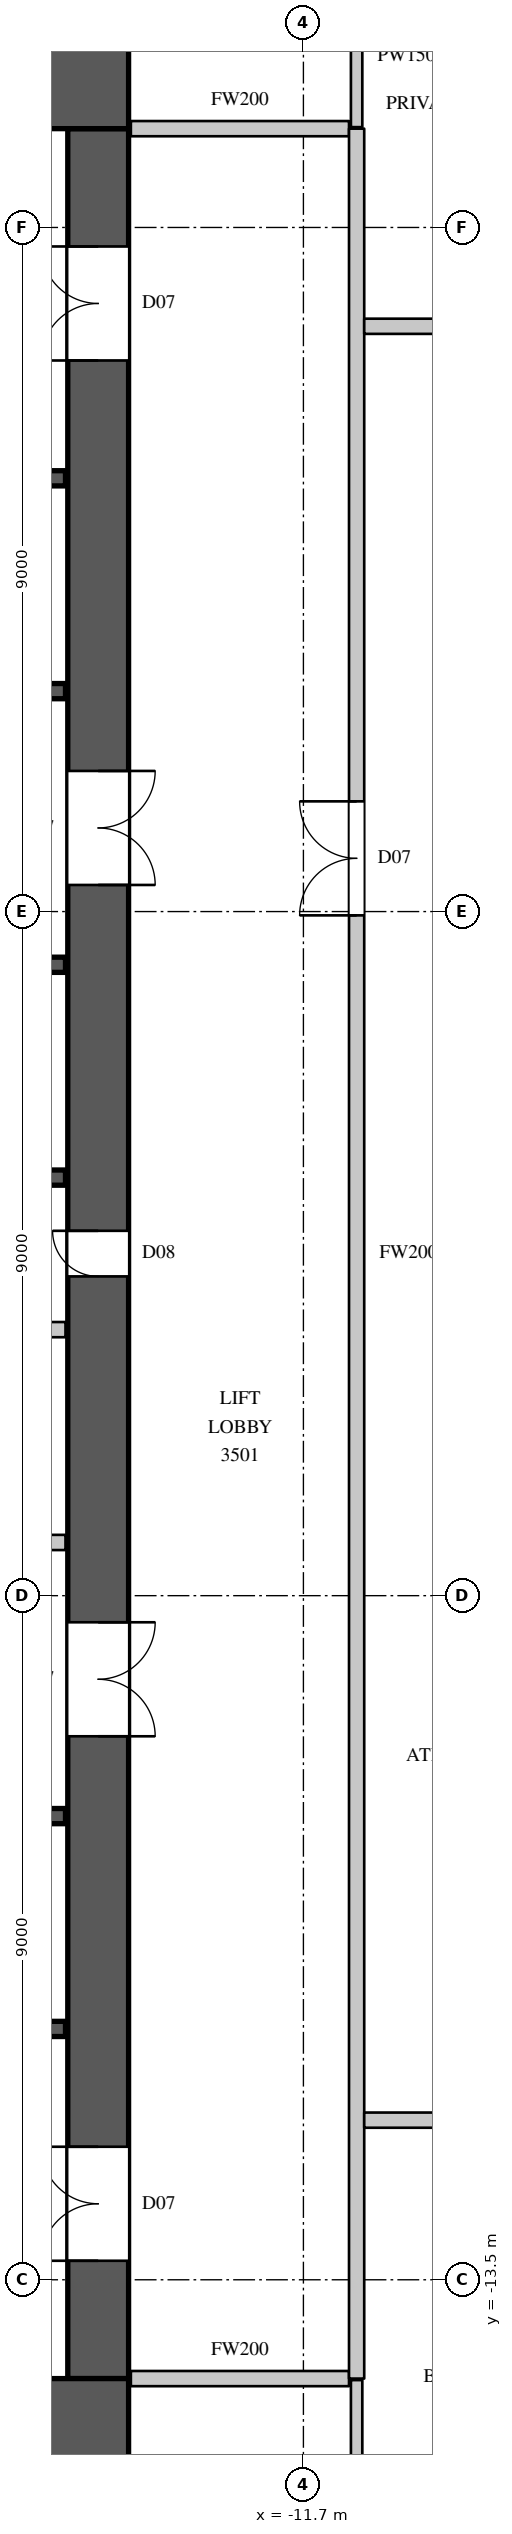
"""IFC4 building model, lengths in metres.
Left out: names, types, materials, properties, quantities, classifications, styles, units other than length and angle.
Written with IfcOpenShell. Run it as: python <this file> out.ifc"""

import sys

from ifc_helpers import new_model, si_unit, direction, frame, frame_2d, origin, place, context, subcontext, project, spatial, rectangle, extrude, element, fill, save


model = new_model("IFC4")
c1 = context("Model", 3, precision=1e-05, world=origin(), true_north=direction((0.0, 1.0)))
c2 = subcontext(c1, "Body", "Model", "MODEL_VIEW")
j1 = project(units=[si_unit("LENGTHUNIT", "METRE"), si_unit("PLANEANGLEUNIT", "RADIAN")], contexts=[c1])
p1 = place(None, origin())
s1 = spatial("IfcSite", under=j1, at=p1, CompositionType="ELEMENT")
p2 = place(p1, origin())
s2 = spatial("IfcBuilding", under=s1, at=p2, CompositionType="ELEMENT")
p3 = place(p2, frame((0.0, 0.0, 164.6)))
s3 = spatial("IfcBuildingStorey", under=s2, at=p3, CompositionType="ELEMENT", Elevation=164.6)
for number, where, z_axis, x_axis in (
    (1, (-30.0, 15.4, 0.0), (0.0, 0.0, 1.0), (1.0, 0.0, 0.0)),
    (2, (-30.0, -15.4, 0.0), (0.0, 0.0, 1.0), (1.0, 0.0, 0.0)),
):
    element("IfcWall", number, at=place(p3, frame(where, z_axis=z_axis, x_axis=x_axis)), inside=s3, PredefinedType="SHEAR", context=c2, shape_type="SweptSolid", body=[
        extrude(rectangle(XDim=16.0, YDim=1.2, at=frame_2d((8.0, 0.0))), origin(), (0.0, 0.0, 1.0), 4.1),
    ])
p4 = place(p3, frame((-14.4, -14.8, 0.0), z_axis=(0.0, 0.0, 1.0), x_axis=(0.0, 1.0, 0.0)))
e3 = element("IfcWall", 3, at=p4, inside=s3, PredefinedType="SHEAR", context=c2, shape_type="SweptSolid", body=[
    extrude(rectangle(XDim=29.6, YDim=0.8, at=frame_2d((14.8, 0.0))), origin(), (0.0, 0.0, 1.0), 4.1),
])
p5 = place(p4, frame((1.55, 0.0, 0.0)))
e4 = element("IfcOpeningElement", 4, at=p5, cuts=e3, PredefinedType="OPENING", context=c2, shape_type="SweptSolid", body=[
    extrude(rectangle(XDim=1.5, YDim=2.4, at=frame_2d((0.75, 1.2))), frame((0.0, 0.41, 0.0), z_axis=(0.0, -1.0, 0.0), x_axis=(1.0, 0.0, 0.0)), (0.0, 0.0, 1.0), 0.82),
])
p6 = place(p4, frame((26.55, 0.0, 0.0)))
e5 = element("IfcOpeningElement", 5, at=p6, cuts=e3, PredefinedType="OPENING", context=c2, shape_type="SweptSolid", body=[
    extrude(rectangle(XDim=1.5, YDim=2.4, at=frame_2d((0.75, 1.2))), frame((0.0, 0.41, 0.0), z_axis=(0.0, -1.0, 0.0), x_axis=(1.0, 0.0, 0.0)), (0.0, 0.0, 1.0), 0.82),
])
p7 = place(p4, frame((8.45, 0.0, 0.0)))
e6 = element("IfcOpeningElement", 6, at=p7, cuts=e3, PredefinedType="OPENING", context=c2, shape_type="SweptSolid", body=[
    extrude(rectangle(XDim=1.5, YDim=2.4, at=frame_2d((0.75, 1.2))), frame((0.0, 0.41, 0.0), z_axis=(0.0, -1.0, 0.0), x_axis=(1.0, 0.0, 0.0)), (0.0, 0.0, 1.0), 0.82),
])
p8 = place(p4, frame((19.65, 0.0, 0.0)))
e7 = element("IfcOpeningElement", 7, at=p8, cuts=e3, PredefinedType="OPENING", context=c2, shape_type="SweptSolid", body=[
    extrude(rectangle(XDim=1.5, YDim=2.4, at=frame_2d((0.75, 1.2))), frame((0.0, 0.41, 0.0), z_axis=(0.0, -1.0, 0.0), x_axis=(1.0, 0.0, 0.0)), (0.0, 0.0, 1.0), 0.82),
])
p9 = place(p4, frame((14.5, 0.0, 0.0)))
e8 = element("IfcOpeningElement", 8, at=p9, cuts=e3, PredefinedType="OPENING", context=c2, shape_type="SweptSolid", body=[
    extrude(rectangle(XDim=0.6, YDim=2.0, at=frame_2d((0.3, 1.0))), frame((0.0, 0.41, 0.0), z_axis=(0.0, -1.0, 0.0), x_axis=(1.0, 0.0, 0.0)), (0.0, 0.0, 1.0), 0.82),
])
p10 = place(p3, frame((-22.62, -3.8, 0.0), z_axis=(0.0, 0.0, 1.0), x_axis=(1.0, 0.0, 0.0)))
e9 = element("IfcWall", 9, at=p10, inside=s3, PredefinedType="PARTITIONING", context=c2, shape_type="SweptSolid", body=[
    extrude(rectangle(XDim=7.79, YDim=0.2, at=frame_2d((3.895, 0.0))), origin(), (0.0, 0.0, 1.0), 3.8),
])
p11 = place(p10, frame((3.45, 0.0, 0.0)))
e10 = element("IfcOpeningElement", 10, at=p11, cuts=e9, PredefinedType="OPENING", context=c2, shape_type="SweptSolid", body=[
    extrude(rectangle(XDim=0.9, YDim=2.2, at=frame_2d((0.45, 1.1))), frame((0.0, 0.11, 0.0), z_axis=(0.0, -1.0, 0.0), x_axis=(1.0, 0.0, 0.0)), (0.0, 0.0, 1.0), 0.22),
])
for number, where, z_axis, x_axis in (
    (11, (-13.97, -14.8, 0.0), (0.0, 0.0, 1.0), (1.0, 0.0, 0.0)),
    (12, (-13.97, 14.8, 0.0), (0.0, 0.0, 1.0), (1.0, 0.0, 0.0)),
):
    element("IfcWall", number, at=place(p3, frame(where, z_axis=z_axis, x_axis=x_axis)), inside=s3, PredefinedType="PARTITIONING", context=c2, shape_type="SweptSolid", body=[
        extrude(rectangle(XDim=2.87, YDim=0.2, at=frame_2d((1.435, 0.0))), origin(), (0.0, 0.0, 1.0), 3.8),
    ])
p12 = place(p3, frame((-11.0, -14.8, 0.0), z_axis=(0.0, 0.0, 1.0), x_axis=(0.0, 1.0, 0.0)))
e13 = element("IfcWall", 13, at=p12, inside=s3, PredefinedType="PARTITIONING", context=c2, shape_type="SweptSolid", body=[
    extrude(rectangle(XDim=29.6, YDim=0.2, at=frame_2d((14.8, 0.0))), origin(), (0.0, 0.0, 1.0), 3.8),
])
p13 = place(p12, frame((19.25, 0.0, 0.0)))
e14 = element("IfcOpeningElement", 14, at=p13, cuts=e13, PredefinedType="OPENING", context=c2, shape_type="SweptSolid", body=[
    extrude(rectangle(XDim=1.5, YDim=2.4, at=frame_2d((0.75, 1.2))), frame((0.0, 0.11, 0.0), z_axis=(0.0, -1.0, 0.0), x_axis=(1.0, 0.0, 0.0)), (0.0, 0.0, 1.0), 0.22),
])
p14 = place(p3, frame((-10.9, -11.4, 0.0), z_axis=(0.0, 0.0, 1.0), x_axis=(1.0, 0.0, 0.0)))
e15 = element("IfcWall", 15, at=p14, inside=s3, PredefinedType="PARTITIONING", context=c2, shape_type="SweptSolid", body=[
    extrude(rectangle(XDim=21.2, YDim=0.2, at=frame_2d((10.6, 0.0))), origin(), (0.0, 0.0, 1.0), 3.8),
])
p15 = place(p14, frame((0.95, 0.0, 0.0)))
e16 = element("IfcOpeningElement", 16, at=p15, cuts=e15, PredefinedType="OPENING", context=c2, shape_type="SweptSolid", body=[
    extrude(rectangle(XDim=0.95, YDim=2.2, at=frame_2d((0.475, 1.1))), frame((0.0, 0.11, 0.0), z_axis=(0.0, -1.0, 0.0), x_axis=(1.0, 0.0, 0.0)), (0.0, 0.0, 1.0), 0.22),
])
p16 = place(p14, frame((4.2, 0.0, 0.0)))
e17 = element("IfcOpeningElement", 17, at=p16, cuts=e15, PredefinedType="OPENING", context=c2, shape_type="SweptSolid", body=[
    extrude(rectangle(XDim=0.95, YDim=2.2, at=frame_2d((0.475, 1.1))), frame((0.0, 0.11, 0.0), z_axis=(0.0, -1.0, 0.0), x_axis=(1.0, 0.0, 0.0)), (0.0, 0.0, 1.0), 0.22),
])
p17 = place(p14, frame((7.1, 0.0, 0.0)))
e18 = element("IfcOpeningElement", 18, at=p17, cuts=e15, PredefinedType="OPENING", context=c2, shape_type="SweptSolid", body=[
    extrude(rectangle(XDim=0.9, YDim=2.2, at=frame_2d((0.45, 1.1))), frame((0.0, 0.11, 0.0), z_axis=(0.0, -1.0, 0.0), x_axis=(1.0, 0.0, 0.0)), (0.0, 0.0, 1.0), 0.22),
])
p18 = place(p14, frame((10.0, 0.0, 0.0)))
e19 = element("IfcOpeningElement", 19, at=p18, cuts=e15, PredefinedType="OPENING", context=c2, shape_type="SweptSolid", body=[
    extrude(rectangle(XDim=0.9, YDim=2.2, at=frame_2d((0.45, 1.1))), frame((0.0, 0.11, 0.0), z_axis=(0.0, -1.0, 0.0), x_axis=(1.0, 0.0, 0.0)), (0.0, 0.0, 1.0), 0.22),
])
p19 = place(p14, frame((13.55, 0.0, 0.0)))
e20 = element("IfcOpeningElement", 20, at=p19, cuts=e15, PredefinedType="OPENING", context=c2, shape_type="SweptSolid", body=[
    extrude(rectangle(XDim=0.9, YDim=2.2, at=frame_2d((0.45, 1.1))), frame((0.0, 0.11, 0.0), z_axis=(0.0, -1.0, 0.0), x_axis=(1.0, 0.0, 0.0)), (0.0, 0.0, 1.0), 0.22),
])
p20 = place(p14, frame((17.85, 0.0, 0.0)))
e21 = element("IfcOpeningElement", 21, at=p20, cuts=e15, PredefinedType="OPENING", context=c2, shape_type="SweptSolid", body=[
    extrude(rectangle(XDim=1.1, YDim=2.4, at=frame_2d((0.55, 1.2))), frame((0.0, 0.11, 0.0), z_axis=(0.0, -1.0, 0.0), x_axis=(1.0, 0.0, 0.0)), (0.0, 0.0, 1.0), 0.22),
])
p21 = place(p3, frame((-10.9, 12.2, 0.0), z_axis=(0.0, 0.0, 1.0), x_axis=(1.0, 0.0, 0.0)))
e22 = element("IfcWall", 22, at=p21, inside=s3, PredefinedType="PARTITIONING", context=c2, shape_type="SweptSolid", body=[
    extrude(rectangle(XDim=3.704, YDim=0.2, at=frame_2d((1.852, 0.0))), origin(), (0.0, 0.0, 1.0), 3.8),
])
p22 = place(p21, frame((1.7, 0.0, 0.0)))
e23 = element("IfcOpeningElement", 23, at=p22, cuts=e22, PredefinedType="OPENING", context=c2, shape_type="SweptSolid", body=[
    extrude(rectangle(XDim=1.1, YDim=2.4, at=frame_2d((0.55, 1.2))), frame((0.0, 0.11, 0.0), z_axis=(0.0, -1.0, 0.0), x_axis=(1.0, 0.0, 0.0)), (0.0, 0.0, 1.0), 0.22),
])
for number, where, z_axis, x_axis in (
    (24, (-11.0, -16.7, 0.0), (0.0, 0.0, 1.0), (0.0, 1.0, 0.0)),
    (25, (-11.0, 14.82, 0.0), (0.0, 0.0, 1.0), (0.0, 1.0, 0.0)),
):
    element("IfcWall", number, at=place(p3, frame(where, z_axis=z_axis, x_axis=x_axis)), inside=s3, PredefinedType="PARTITIONING", context=c2, shape_type="SweptSolid", body=[
        extrude(rectangle(XDim=1.88, YDim=0.15, at=frame_2d((0.94, 0.0))), origin(), (0.0, 0.0, 1.0), 3.8),
    ])
p23 = place(p3, frame((-29.17, -1.0, 0.0), z_axis=(0.0, 0.0, 1.0), x_axis=(1.0, 0.0, 0.0)))
e26 = element("IfcWall", 26, at=p23, inside=s3, PredefinedType="PARTITIONING", context=c2, shape_type="SweptSolid", body=[
    extrude(rectangle(XDim=14.34, YDim=0.2, at=frame_2d((7.17, 0.0))), origin(), (0.0, 0.0, 1.0), 3.8),
])
p24 = place(p3, frame((-26.08, 1.0, 0.0), z_axis=(0.0, 0.0, 1.0), x_axis=(1.0, 0.0, 0.0)))
e27 = element("IfcWall", 27, at=p24, inside=s3, PredefinedType="SHEAR", context=c2, shape_type="SweptSolid", body=[
    extrude(rectangle(XDim=11.25, YDim=0.2, at=frame_2d((5.625, 0.0))), origin(), (0.0, 0.0, 1.0), 3.8),
])
p25 = place(p3, frame((-26.08, 3.8, 0.0), z_axis=(0.0, 0.0, 1.0), x_axis=(1.0, 0.0, 0.0)))
e28 = element("IfcWall", 28, at=p25, inside=s3, PredefinedType="SHEAR", context=c2, shape_type="SweptSolid", body=[
    extrude(rectangle(XDim=11.25, YDim=0.2, at=frame_2d((5.625, 0.0))), origin(), (0.0, 0.0, 1.0), 3.8),
])
p26 = place(p25, frame((0.8, 0.0, 0.0)))
e29 = element("IfcOpeningElement", 29, at=p26, cuts=e28, PredefinedType="OPENING", context=c2, shape_type="SweptSolid", body=[
    extrude(rectangle(XDim=1.1, YDim=2.2, at=frame_2d((0.55, 1.1))), frame((0.0, 0.11, 0.0), z_axis=(0.0, -1.0, 0.0), x_axis=(1.0, 0.0, 0.0)), (0.0, 0.0, 1.0), 0.22),
])
p27 = place(p25, frame((3.55, 0.0, 0.0)))
e30 = element("IfcOpeningElement", 30, at=p27, cuts=e28, PredefinedType="OPENING", context=c2, shape_type="SweptSolid", body=[
    extrude(rectangle(XDim=1.1, YDim=2.2, at=frame_2d((0.55, 1.1))), frame((0.0, 0.11, 0.0), z_axis=(0.0, -1.0, 0.0), x_axis=(1.0, 0.0, 0.0)), (0.0, 0.0, 1.0), 0.22),
])
p28 = place(p25, frame((6.25, 0.0, 0.0)))
e31 = element("IfcOpeningElement", 31, at=p28, cuts=e28, PredefinedType="OPENING", context=c2, shape_type="SweptSolid", body=[
    extrude(rectangle(XDim=1.1, YDim=2.2, at=frame_2d((0.55, 1.1))), frame((0.0, 0.11, 0.0), z_axis=(0.0, -1.0, 0.0), x_axis=(1.0, 0.0, 0.0)), (0.0, 0.0, 1.0), 0.22),
])
p29 = place(p25, frame((9.15, 0.0, 0.0)))
e32 = element("IfcOpeningElement", 32, at=p29, cuts=e28, PredefinedType="OPENING", context=c2, shape_type="SweptSolid", body=[
    extrude(rectangle(XDim=1.1, YDim=2.2, at=frame_2d((0.55, 1.1))), frame((0.0, 0.11, 0.0), z_axis=(0.0, -1.0, 0.0), x_axis=(1.0, 0.0, 0.0)), (0.0, 0.0, 1.0), 0.22),
])
p30 = place(p3, frame((-17.92, -10.2, 0.0), z_axis=(0.0, 0.0, 1.0), x_axis=(1.0, 0.0, 0.0)))
e33 = element("IfcWall", 33, at=p30, inside=s3, PredefinedType="SHEAR", context=c2, shape_type="SweptSolid", body=[
    extrude(rectangle(XDim=3.09, YDim=0.2, at=frame_2d((1.545, 0.0))), origin(), (0.0, 0.0, 1.0), 3.8),
])
p31 = place(p30, frame((1.0, 0.0, 0.0)))
e34 = element("IfcOpeningElement", 34, at=p31, cuts=e33, PredefinedType="OPENING", context=c2, shape_type="SweptSolid", body=[
    extrude(rectangle(XDim=1.1, YDim=2.2, at=frame_2d((0.55, 1.1))), frame((0.0, 0.11, 0.0), z_axis=(0.0, -1.0, 0.0), x_axis=(1.0, 0.0, 0.0)), (0.0, 0.0, 1.0), 0.22),
])
p32 = place(p3, frame((-17.9, -7.4, 0.0), z_axis=(0.0, 0.0, 1.0), x_axis=(1.0, 0.0, 0.0)))
e35 = element("IfcWall", 35, at=p32, inside=s3, PredefinedType="SHEAR", context=c2, shape_type="SweptSolid", body=[
    extrude(rectangle(XDim=3.07, YDim=0.2, at=frame_2d((1.535, 0.0))), origin(), (0.0, 0.0, 1.0), 3.8),
])
p33 = place(p3, frame((-17.92, 7.4, 0.0), z_axis=(0.0, 0.0, 1.0), x_axis=(1.0, 0.0, 0.0)))
e36 = element("IfcWall", 36, at=p33, inside=s3, PredefinedType="SHEAR", context=c2, shape_type="SweptSolid", body=[
    extrude(rectangle(XDim=3.09, YDim=0.2, at=frame_2d((1.545, 0.0))), origin(), (0.0, 0.0, 1.0), 3.8),
])
p34 = place(p3, frame((-17.92, 10.2, 0.0), z_axis=(0.0, 0.0, 1.0), x_axis=(1.0, 0.0, 0.0)))
e37 = element("IfcWall", 37, at=p34, inside=s3, PredefinedType="SHEAR", context=c2, shape_type="SweptSolid", body=[
    extrude(rectangle(XDim=3.09, YDim=0.2, at=frame_2d((1.545, 0.0))), origin(), (0.0, 0.0, 1.0), 3.8),
])
p35 = place(p34, frame((1.0, 0.0, 0.0)))
e38 = element("IfcOpeningElement", 38, at=p35, cuts=e37, PredefinedType="OPENING", context=c2, shape_type="SweptSolid", body=[
    extrude(rectangle(XDim=1.1, YDim=2.2, at=frame_2d((0.55, 1.1))), frame((0.0, 0.11, 0.0), z_axis=(0.0, -1.0, 0.0), x_axis=(1.0, 0.0, 0.0)), (0.0, 0.0, 1.0), 0.22),
])
p36 = place(p13, origin())
e39 = element("IfcDoor", 39, at=p36, inside=s3, OperationType="DOUBLE_DOOR_SINGLE_SWING", PredefinedType="DOOR", context=c2, shape_type="SweptSolid", body=[
    extrude(rectangle(XDim=1.5, YDim=2.4, at=frame_2d((0.75, 1.2))), frame((0.0, 0.025, 0.0), z_axis=(0.0, -1.0, 0.0), x_axis=(1.0, 0.0, 0.0)), (0.0, 0.0, 1.0), 0.05),
])
fill(e14, e39)
p37 = place(p5, origin())
e40 = element("IfcDoor", 40, at=p37, inside=s3, OperationType="DOUBLE_DOOR_SINGLE_SWING", PredefinedType="DOOR", context=c2, shape_type="SweptSolid", body=[
    extrude(rectangle(XDim=1.5, YDim=2.4, at=frame_2d((0.75, 1.2))), frame((0.0, 0.395, 0.0), z_axis=(0.0, -1.0, 0.0), x_axis=(1.0, 0.0, 0.0)), (0.0, 0.0, 1.0), 0.05),
])
fill(e4, e40)
p38 = place(p6, origin())
e41 = element("IfcDoor", 41, at=p38, inside=s3, OperationType="DOUBLE_DOOR_SINGLE_SWING", PredefinedType="DOOR", context=c2, shape_type="SweptSolid", body=[
    extrude(rectangle(XDim=1.5, YDim=2.4, at=frame_2d((0.75, 1.2))), frame((0.0, 0.395, 0.0), z_axis=(0.0, -1.0, 0.0), x_axis=(1.0, 0.0, 0.0)), (0.0, 0.0, 1.0), 0.05),
])
fill(e5, e41)
p39 = place(p7, origin())
e42 = element("IfcDoor", 42, at=p39, inside=s3, OperationType="DOUBLE_DOOR_SINGLE_SWING", PredefinedType="DOOR", context=c2, shape_type="SweptSolid", body=[
    extrude(rectangle(XDim=1.5, YDim=2.4, at=frame_2d((0.75, 1.2))), frame((0.0, -0.345, 0.0), z_axis=(0.0, -1.0, 0.0), x_axis=(1.0, 0.0, 0.0)), (0.0, 0.0, 1.0), 0.05),
])
fill(e6, e42)
p40 = place(p8, origin())
e43 = element("IfcDoor", 43, at=p40, inside=s3, OperationType="DOUBLE_DOOR_SINGLE_SWING", PredefinedType="DOOR", context=c2, shape_type="SweptSolid", body=[
    extrude(rectangle(XDim=1.5, YDim=2.4, at=frame_2d((0.75, 1.2))), frame((0.0, -0.345, 0.0), z_axis=(0.0, -1.0, 0.0), x_axis=(1.0, 0.0, 0.0)), (0.0, 0.0, 1.0), 0.05),
])
fill(e7, e43)
p41 = place(p9, origin())
e44 = element("IfcDoor", 44, at=p41, inside=s3, OperationType="SINGLE_SWING_RIGHT", PredefinedType="DOOR", context=c2, shape_type="SweptSolid", body=[
    extrude(rectangle(XDim=0.6, YDim=2.0, at=frame_2d((0.3, 1.0))), frame((0.0, 0.395, 0.0), z_axis=(0.0, -1.0, 0.0), x_axis=(1.0, 0.0, 0.0)), (0.0, 0.0, 1.0), 0.05),
])
fill(e8, e44)
save(model, sys.argv[1])
